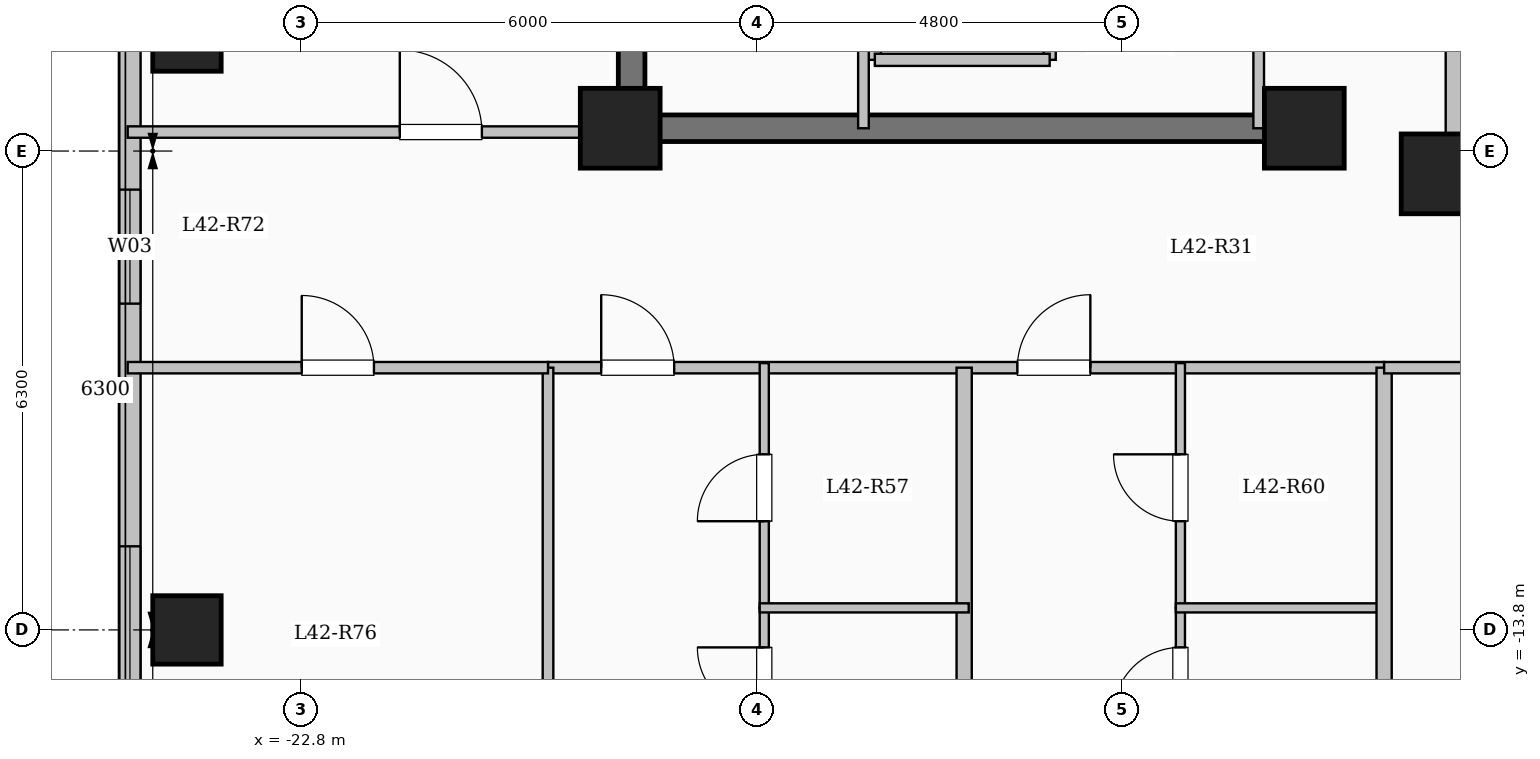
"""IFC4 building model, lengths in metres.
Left out: names, types, materials, properties, quantities, classifications, styles, units other than length and angle.
Written with IfcOpenShell. Run it as: python <this file> out.ifc"""

import sys

from ifc_helpers import new_model, si_unit, direction, frame, frame_2d, origin, origin_2d, place, context, subcontext, project, spatial, rectangle, extrude, element, fill, save


model = new_model("IFC4")
c1 = context("Model", 3, precision=1e-05, world=origin(), true_north=direction((0.0, 1.0)))
c2 = subcontext(c1, "Body", "Model", "MODEL_VIEW")
j1 = project(units=[si_unit("LENGTHUNIT", "METRE"), si_unit("PLANEANGLEUNIT", "RADIAN")], contexts=[c1])
p1 = place(None, origin())
s1 = spatial("IfcSite", under=j1, at=p1, CompositionType="ELEMENT")
p2 = place(p1, origin())
s2 = spatial("IfcBuilding", under=s1, at=p2, CompositionType="ELEMENT")
p3 = place(p2, frame((0.0, 0.0, 156.05)))
s3 = spatial("IfcBuildingStorey", under=s2, at=p3, CompositionType="ELEMENT", Elevation=156.05)
for number, where, z_axis, x_axis in (
    (1, (-7.8, -7.8, 0.0), (0.0, 0.0, 1.0), (1.0, 0.0, 0.0)),
    (2, (-9.6, -7.2, 0.0), (0.0, 0.0, 1.0), (1.0, 0.0, 0.0)),
    (3, (-18.6, -7.2, 0.0), (0.0, 0.0, 1.0), (1.0, 0.0, 0.0)),
):
    element("IfcColumn", number, at=place(p3, frame(where, z_axis=z_axis, x_axis=x_axis)), inside=s3, PredefinedType="COLUMN", context=c2, shape_type="SweptSolid", body=[
        extrude(rectangle(XDim=1.05, YDim=1.05, at=origin_2d()), origin(), (0.0, 0.0, 1.0), 3.35),
    ])
for number, where, z_axis, x_axis in (
    (4, (-24.3, -13.8, 0.0), (0.0, 0.0, 1.0), (1.0, 0.0, 0.0)),
    (5, (-24.3, -6.0, 0.0), (0.0, 0.0, 1.0), (1.0, 0.0, 0.0)),
):
    element("IfcColumn", number, at=place(p3, frame(where, z_axis=z_axis, x_axis=x_axis)), inside=s3, PredefinedType="COLUMN", context=c2, shape_type="SweptSolid", body=[
        extrude(rectangle(XDim=0.9, YDim=0.9, at=origin_2d()), origin(), (0.0, 0.0, 1.0), 3.35),
    ])
p4 = place(p3, frame((-7.62, -7.62, 0.0), z_axis=(0.0, 0.0, 1.0), x_axis=(1.0, 0.0, 0.0)))
e6 = element("IfcWall", 6, at=p4, inside=s3, PredefinedType="SOLIDWALL", context=c2, shape_type="SweptSolid", body=[
    extrude(rectangle(XDim=15.24, YDim=0.24, at=frame_2d((7.62, 0.0))), origin(), (0.0, 0.0, 1.0), 3.1),
])
p5 = place(p4, frame((6.92, 0.0, 0.95)))
e7 = element("IfcOpeningElement", 7, at=p5, cuts=e6, PredefinedType="OPENING", context=c2, shape_type="SweptSolid", body=[
    extrude(rectangle(XDim=1.4, YDim=1.5, at=frame_2d((0.7, 0.75))), frame((0.0, 0.13, 0.0), z_axis=(0.0, -1.0, 0.0), x_axis=(1.0, 0.0, 0.0)), (0.0, 0.0, 1.0), 0.26),
])
p6 = place(p3, frame((-7.62, 7.62, 0.0), z_axis=(0.0, 0.0, 1.0), x_axis=(0.0, -1.0, 0.0)))
e8 = element("IfcWall", 8, at=p6, inside=s3, PredefinedType="SOLIDWALL", context=c2, shape_type="SweptSolid", body=[
    extrude(rectangle(XDim=15.24, YDim=0.24, at=frame_2d((7.62, 0.0))), origin(), (0.0, 0.0, 1.0), 3.1),
])
p7 = place(p6, frame((6.92, 0.0, 0.95)))
e9 = element("IfcOpeningElement", 9, at=p7, cuts=e8, PredefinedType="OPENING", context=c2, shape_type="SweptSolid", body=[
    extrude(rectangle(XDim=1.4, YDim=1.5, at=frame_2d((0.7, 0.75))), frame((0.0, 0.13, 0.0), z_axis=(0.0, -1.0, 0.0), x_axis=(1.0, 0.0, 0.0)), (0.0, 0.0, 1.0), 0.26),
])
p8 = place(p3, frame((-25.05, -17.25, 0.0), z_axis=(0.0, 0.0, 1.0), x_axis=(0.0, 1.0, 0.0)))
e10 = element("IfcWall", 10, at=p8, inside=s3, PredefinedType="SOLIDWALL", context=c2, shape_type="SweptSolid", body=[
    extrude(rectangle(XDim=34.5, YDim=0.28, at=frame_2d((17.25, 0.0))), origin(), (0.0, 0.0, 1.0), 3.1),
])
p9 = place(p8, frame((2.35, 0.0, 0.9)))
e11 = element("IfcOpeningElement", 11, at=p9, cuts=e10, PredefinedType="OPENING", context=c2, shape_type="SweptSolid", body=[
    extrude(rectangle(XDim=2.2, YDim=1.75, at=frame_2d((1.1, 0.875))), frame((0.0, 0.15, 0.0), z_axis=(0.0, -1.0, 0.0), x_axis=(1.0, 0.0, 0.0)), (0.0, 0.0, 1.0), 0.3),
])
p10 = place(p8, frame((7.742, 0.0, 0.9)))
e12 = element("IfcOpeningElement", 12, at=p10, cuts=e10, PredefinedType="OPENING", context=c2, shape_type="SweptSolid", body=[
    extrude(rectangle(XDim=1.5, YDim=1.65, at=frame_2d((0.75, 0.825))), frame((0.0, 0.15, 0.0), z_axis=(0.0, -1.0, 0.0), x_axis=(1.0, 0.0, 0.0)), (0.0, 0.0, 1.0), 0.3),
])
p11 = place(p8, frame((18.0, 0.0, 0.9)))
e13 = element("IfcOpeningElement", 13, at=p11, cuts=e10, PredefinedType="OPENING", context=c2, shape_type="SweptSolid", body=[
    extrude(rectangle(XDim=2.0, YDim=1.7, at=frame_2d((1.0, 0.85))), frame((0.0, 0.15, 0.0), z_axis=(0.0, -1.0, 0.0), x_axis=(1.0, 0.0, 0.0)), (0.0, 0.0, 1.0), 0.3),
])
p12 = place(p8, frame((28.375, 0.0, 0.95)))
e14 = element("IfcOpeningElement", 14, at=p12, cuts=e10, PredefinedType="OPENING", context=c2, shape_type="SweptSolid", body=[
    extrude(rectangle(XDim=1.0, YDim=1.5, at=frame_2d((0.5, 0.75))), frame((0.0, 0.15, 0.0), z_axis=(0.0, -1.0, 0.0), x_axis=(1.0, 0.0, 0.0)), (0.0, 0.0, 1.0), 0.3),
])
p13 = place(p8, frame((31.125, 0.0, 0.9)))
e15 = element("IfcOpeningElement", 15, at=p13, cuts=e10, PredefinedType="OPENING", context=c2, shape_type="SweptSolid", body=[
    extrude(rectangle(XDim=2.0, YDim=1.7, at=frame_2d((1.0, 0.85))), frame((0.0, 0.15, 0.0), z_axis=(0.0, -1.0, 0.0), x_axis=(1.0, 0.0, 0.0)), (0.0, 0.0, 1.0), 0.3),
])
for number, where, z_axis, x_axis in (
    (16, (-15.25, -6.3, 0.0), (0.0, 0.0, 1.0), (0.0, 1.0, 0.0)),
    (17, (-12.95, -6.3, 0.0), (0.0, 0.0, 1.0), (0.0, 1.0, 0.0)),
):
    element("IfcWall", number, at=place(p3, frame(where, z_axis=z_axis, x_axis=x_axis)), inside=s3, PredefinedType="SOLIDWALL", context=c2, shape_type="SweptSolid", body=[
        extrude(rectangle(XDim=2.6, YDim=0.16, at=frame_2d((1.3, 0.0))), origin(), (0.0, 0.0, 1.0), 3.1),
    ])
p14 = place(p3, frame((-15.25, -6.3, 0.0), z_axis=(0.0, 0.0, 1.0), x_axis=(1.0, 0.0, 0.0)))
e18 = element("IfcWall", 18, at=p14, inside=s3, PredefinedType="SOLIDWALL", context=c2, shape_type="SweptSolid", body=[
    extrude(rectangle(XDim=2.3, YDim=0.16, at=frame_2d((1.15, 0.0))), origin(), (0.0, 0.0, 1.0), 3.1),
])
p15 = place(p3, frame((-18.45, -7.375, 0.0), z_axis=(0.0, 0.0, 1.0), x_axis=(0.0, 1.0, 0.0)))
e19 = element("IfcWall", 19, at=p15, inside=s3, PredefinedType="SHEAR", context=c2, shape_type="SweptSolid", body=[
    extrude(rectangle(XDim=14.05, YDim=0.35, at=frame_2d((7.025, 0.0))), origin(), (0.0, 0.0, 1.0), 3.35),
])
p16 = place(p3, frame((-18.625, -7.2, 0.0), z_axis=(0.0, 0.0, 1.0), x_axis=(1.0, 0.0, 0.0)))
e20 = element("IfcWall", 20, at=p16, inside=s3, PredefinedType="SHEAR", context=c2, shape_type="SweptSolid", body=[
    extrude(rectangle(XDim=8.55, YDim=0.35, at=frame_2d((4.275, 0.0))), origin(), (0.0, 0.0, 1.0), 3.35),
])
p17 = place(p3, frame((-15.4, -7.2, 0.0), z_axis=(0.0, 0.0, 1.0), x_axis=(0.0, 1.0, 0.0)))
e21 = element("IfcWall", 21, at=p17, inside=s3, PredefinedType="PARTITIONING", context=c2, shape_type="SweptSolid", body=[
    extrude(rectangle(XDim=10.45, YDim=0.14, at=frame_2d((5.225, 0.0))), origin(), (0.0, 0.0, 1.0), 3.1),
])
p18 = place(p17, frame((9.25, 0.0, 0.0)))
e22 = element("IfcOpeningElement", 22, at=p18, cuts=e21, PredefinedType="OPENING", context=c2, shape_type="SweptSolid", body=[
    extrude(rectangle(XDim=0.9, YDim=2.08, at=frame_2d((0.45, 1.04))), frame((0.0, 0.08, 0.0), z_axis=(0.0, -1.0, 0.0), x_axis=(1.0, 0.0, 0.0)), (0.0, 0.0, 1.0), 0.16),
])
p19 = place(p3, frame((-10.2, -7.2, 0.0), z_axis=(0.0, 0.0, 1.0), x_axis=(0.0, 1.0, 0.0)))
e23 = element("IfcWall", 23, at=p19, inside=s3, PredefinedType="PARTITIONING", context=c2, shape_type="SweptSolid", body=[
    extrude(rectangle(XDim=9.12, YDim=0.14, at=frame_2d((4.56, 0.0))), origin(), (0.0, 0.0, 1.0), 3.1),
])
p20 = place(p19, frame((1.9, 0.0, 0.0)))
e24 = element("IfcOpeningElement", 24, at=p20, cuts=e23, PredefinedType="OPENING", context=c2, shape_type="SweptSolid", body=[
    extrude(rectangle(XDim=0.95, YDim=2.12, at=frame_2d((0.475, 1.06))), frame((0.0, 0.08, 0.0), z_axis=(0.0, -1.0, 0.0), x_axis=(1.0, 0.0, 0.0)), (0.0, 0.0, 1.0), 0.16),
])
p21 = place(p19, frame((5.0, 0.0, 0.0)))
e25 = element("IfcOpeningElement", 25, at=p21, cuts=e23, PredefinedType="OPENING", context=c2, shape_type="SweptSolid", body=[
    extrude(rectangle(XDim=0.95, YDim=2.12, at=frame_2d((0.475, 1.06))), frame((0.0, 0.08, 0.0), z_axis=(0.0, -1.0, 0.0), x_axis=(1.0, 0.0, 0.0)), (0.0, 0.0, 1.0), 0.16),
])
p22 = place(p3, frame((-19.55, -10.35, 0.0), z_axis=(0.0, 0.0, 1.0), x_axis=(1.0, 0.0, 0.0)))
e26 = element("IfcWall", 26, at=p22, inside=s3, PredefinedType="PARTITIONING", context=c2, shape_type="SweptSolid", body=[
    extrude(rectangle(XDim=11.0, YDim=0.15, at=frame_2d((5.5, 0.0))), origin(), (0.0, 0.0, 1.0), 3.1),
])
p23 = place(p22, frame((0.7, 0.0, 0.0)))
e27 = element("IfcOpeningElement", 27, at=p23, cuts=e26, PredefinedType="OPENING", context=c2, shape_type="SweptSolid", body=[
    extrude(rectangle(XDim=0.96, YDim=2.15, at=frame_2d((0.48, 1.075))), frame((0.0, 0.085, 0.0), z_axis=(0.0, -1.0, 0.0), x_axis=(1.0, 0.0, 0.0)), (0.0, 0.0, 1.0), 0.17),
])
p24 = place(p22, frame((6.175, 0.0, 0.0)))
e28 = element("IfcOpeningElement", 28, at=p24, cuts=e26, PredefinedType="OPENING", context=c2, shape_type="SweptSolid", body=[
    extrude(rectangle(XDim=0.96, YDim=2.15, at=frame_2d((0.48, 1.075))), frame((0.0, 0.085, 0.0), z_axis=(0.0, -1.0, 0.0), x_axis=(1.0, 0.0, 0.0)), (0.0, 0.0, 1.0), 0.17),
])
p25 = place(p3, frame((-14.075, -21.2, 0.0), z_axis=(0.0, 0.0, 1.0), x_axis=(0.0, 1.0, 0.0)))
e29 = element("IfcWall", 29, at=p25, inside=s3, PredefinedType="SOLIDWALL", context=c2, shape_type="SweptSolid", body=[
    extrude(rectangle(XDim=10.85, YDim=0.2, at=frame_2d((5.425, 0.0))), origin(), (0.0, 0.0, 1.0), 3.1),
])
p26 = place(p3, frame((-16.705, -21.2, 0.0), z_axis=(0.0, 0.0, 1.0), x_axis=(0.0, 1.0, 0.0)))
e30 = element("IfcWall", 30, at=p26, inside=s3, PredefinedType="PARTITIONING", context=c2, shape_type="SweptSolid", body=[
    extrude(rectangle(XDim=7.69, YDim=0.12, at=frame_2d((3.845, 0.0))), origin(), (0.0, 0.0, 1.0), 3.1),
])
p27 = place(p26, frame((6.29, 0.0, 0.0)))
e31 = element("IfcOpeningElement", 31, at=p27, cuts=e30, PredefinedType="OPENING", context=c2, shape_type="SweptSolid", body=[
    extrude(rectangle(XDim=0.88, YDim=2.1, at=frame_2d((0.44, 1.05))), frame((0.0, 0.07, 0.0), z_axis=(0.0, -1.0, 0.0), x_axis=(1.0, 0.0, 0.0)), (0.0, 0.0, 1.0), 0.14),
])
p28 = place(p3, frame((-16.705, -13.51, 0.0), z_axis=(0.0, 0.0, 1.0), x_axis=(0.0, 1.0, 0.0)))
e32 = element("IfcWall", 32, at=p28, inside=s3, PredefinedType="PARTITIONING", context=c2, shape_type="SweptSolid", body=[
    extrude(rectangle(XDim=3.22, YDim=0.12, at=frame_2d((1.61, 0.0))), origin(), (0.0, 0.0, 1.0), 3.1),
])
p29 = place(p28, frame((1.14, 0.0, 0.0)))
e33 = element("IfcOpeningElement", 33, at=p29, cuts=e32, PredefinedType="OPENING", context=c2, shape_type="SweptSolid", body=[
    extrude(rectangle(XDim=0.88, YDim=2.1, at=frame_2d((0.44, 1.05))), frame((0.0, 0.07, 0.0), z_axis=(0.0, -1.0, 0.0), x_axis=(1.0, 0.0, 0.0)), (0.0, 0.0, 1.0), 0.14),
])
p30 = place(p3, frame((-16.765, -13.51, 0.0), z_axis=(0.0, 0.0, 1.0), x_axis=(1.0, 0.0, 0.0)))
e34 = element("IfcWall", 34, at=p30, inside=s3, PredefinedType="PARTITIONING", context=c2, shape_type="SweptSolid", body=[
    extrude(rectangle(XDim=2.75, YDim=0.12, at=frame_2d((1.375, 0.0))), origin(), (0.0, 0.0, 1.0), 3.1),
])
p31 = place(p3, frame((-11.23, -21.2, 0.0), z_axis=(0.0, 0.0, 1.0), x_axis=(0.0, 1.0, 0.0)))
e35 = element("IfcWall", 35, at=p31, inside=s3, PredefinedType="PARTITIONING", context=c2, shape_type="SweptSolid", body=[
    extrude(rectangle(XDim=7.69, YDim=0.12, at=frame_2d((3.845, 0.0))), origin(), (0.0, 0.0, 1.0), 3.1),
])
p32 = place(p31, frame((6.29, 0.0, 0.0)))
e36 = element("IfcOpeningElement", 36, at=p32, cuts=e35, PredefinedType="OPENING", context=c2, shape_type="SweptSolid", body=[
    extrude(rectangle(XDim=0.88, YDim=2.1, at=frame_2d((0.44, 1.05))), frame((0.0, 0.07, 0.0), z_axis=(0.0, -1.0, 0.0), x_axis=(1.0, 0.0, 0.0)), (0.0, 0.0, 1.0), 0.14),
])
p33 = place(p3, frame((-11.23, -13.51, 0.0), z_axis=(0.0, 0.0, 1.0), x_axis=(0.0, 1.0, 0.0)))
e37 = element("IfcWall", 37, at=p33, inside=s3, PredefinedType="PARTITIONING", context=c2, shape_type="SweptSolid", body=[
    extrude(rectangle(XDim=3.22, YDim=0.12, at=frame_2d((1.61, 0.0))), origin(), (0.0, 0.0, 1.0), 3.1),
])
p34 = place(p33, frame((1.14, 0.0, 0.0)))
e38 = element("IfcOpeningElement", 38, at=p34, cuts=e37, PredefinedType="OPENING", context=c2, shape_type="SweptSolid", body=[
    extrude(rectangle(XDim=0.88, YDim=2.1, at=frame_2d((0.44, 1.05))), frame((0.0, 0.07, 0.0), z_axis=(0.0, -1.0, 0.0), x_axis=(1.0, 0.0, 0.0)), (0.0, 0.0, 1.0), 0.14),
])
p35 = place(p3, frame((-11.29, -13.51, 0.0), z_axis=(0.0, 0.0, 1.0), x_axis=(1.0, 0.0, 0.0)))
e39 = element("IfcWall", 39, at=p35, inside=s3, PredefinedType="PARTITIONING", context=c2, shape_type="SweptSolid", body=[
    extrude(rectangle(XDim=2.75, YDim=0.12, at=frame_2d((1.375, 0.0))), origin(), (0.0, 0.0, 1.0), 3.1),
])
p36 = place(p3, frame((-8.55, -21.804, 0.0), z_axis=(0.0, 0.0, 1.0), x_axis=(0.0, 1.0, 0.0)))
e40 = element("IfcWall", 40, at=p36, inside=s3, PredefinedType="SOLIDWALL", context=c2, shape_type="SweptSolid", body=[
    extrude(rectangle(XDim=11.454, YDim=0.2, at=frame_2d((5.727, 0.0))), origin(), (0.0, 0.0, 1.0), 3.1),
])
p37 = place(p3, frame((-8.55, -10.35, 0.0), z_axis=(0.0, 0.0, 1.0), x_axis=(1.0, 0.0, 0.0)))
e41 = element("IfcWall", 41, at=p37, inside=s3, PredefinedType="PARTITIONING", context=c2, shape_type="SweptSolid", body=[
    extrude(rectangle(XDim=17.1, YDim=0.15, at=frame_2d((8.55, 0.0))), origin(), (0.0, 0.0, 1.0), 3.1),
])
p38 = place(p37, frame((1.6, 0.0, 0.0)))
e42 = element("IfcOpeningElement", 42, at=p38, cuts=e41, PredefinedType="OPENING", context=c2, shape_type="SweptSolid", body=[
    extrude(rectangle(XDim=0.95, YDim=2.15, at=frame_2d((0.475, 1.075))), frame((0.0, 0.085, 0.0), z_axis=(0.0, -1.0, 0.0), x_axis=(1.0, 0.0, 0.0)), (0.0, 0.0, 1.0), 0.17),
])
p39 = place(p37, frame((10.5, 0.0, 0.0)))
e43 = element("IfcOpeningElement", 43, at=p39, cuts=e41, PredefinedType="OPENING", context=c2, shape_type="SweptSolid", body=[
    extrude(rectangle(XDim=0.95, YDim=2.15, at=frame_2d((0.475, 1.075))), frame((0.0, 0.085, 0.0), z_axis=(0.0, -1.0, 0.0), x_axis=(1.0, 0.0, 0.0)), (0.0, 0.0, 1.0), 0.17),
])
p40 = place(p3, frame((-25.08, -7.25, 0.0), z_axis=(0.0, 0.0, 1.0), x_axis=(1.0, 0.0, 0.0)))
e44 = element("IfcWall", 44, at=p40, inside=s3, PredefinedType="PARTITIONING", context=c2, shape_type="SweptSolid", body=[
    extrude(rectangle(XDim=6.63, YDim=0.15, at=frame_2d((3.315, 0.0))), origin(), (0.0, 0.0, 1.0), 3.1),
])
p41 = place(p40, frame((3.58, 0.0, 0.0)))
e45 = element("IfcOpeningElement", 45, at=p41, cuts=e44, PredefinedType="OPENING", context=c2, shape_type="SweptSolid", body=[
    extrude(rectangle(XDim=1.08, YDim=2.15, at=frame_2d((0.54, 1.075))), frame((0.0, 0.085, 0.0), z_axis=(0.0, -1.0, 0.0), x_axis=(1.0, 0.0, 0.0)), (0.0, 0.0, 1.0), 0.17),
])
p42 = place(p3, frame((-19.55, -17.25, 0.0), z_axis=(0.0, 0.0, 1.0), x_axis=(0.0, 1.0, 0.0)))
e46 = element("IfcWall", 46, at=p42, inside=s3, PredefinedType="PARTITIONING", context=c2, shape_type="SweptSolid", body=[
    extrude(rectangle(XDim=6.9, YDim=0.14, at=frame_2d((3.45, 0.0))), origin(), (0.0, 0.0, 1.0), 3.1),
])
p43 = place(p3, frame((-25.08, -10.35, 0.0), z_axis=(0.0, 0.0, 1.0), x_axis=(1.0, 0.0, 0.0)))
e47 = element("IfcWall", 47, at=p43, inside=s3, PredefinedType="PARTITIONING", context=c2, shape_type="SweptSolid", body=[
    extrude(rectangle(XDim=5.53, YDim=0.15, at=frame_2d((2.765, 0.0))), origin(), (0.0, 0.0, 1.0), 3.1),
])
p44 = place(p43, frame((2.29, 0.0, 0.0)))
e48 = element("IfcOpeningElement", 48, at=p44, cuts=e47, PredefinedType="OPENING", context=c2, shape_type="SweptSolid", body=[
    extrude(rectangle(XDim=0.95, YDim=2.15, at=frame_2d((0.475, 1.075))), frame((0.0, 0.085, 0.0), z_axis=(0.0, -1.0, 0.0), x_axis=(1.0, 0.0, 0.0)), (0.0, 0.0, 1.0), 0.17),
])
p45 = place(p9, origin())
e49 = element("IfcWindow", 49, at=p45, inside=s3, PartitioningType="SINGLE_PANEL", PredefinedType="WINDOW", context=c2, shape_type="SweptSolid", body=[
    extrude(rectangle(XDim=2.2, YDim=1.75, at=frame_2d((1.1, 0.875))), frame((0.0, 0.03, 0.0), z_axis=(0.0, -1.0, 0.0), x_axis=(1.0, 0.0, 0.0)), (0.0, 0.0, 1.0), 0.06),
])
fill(e11, e49)
p46 = place(p10, origin())
e50 = element("IfcWindow", 50, at=p46, inside=s3, PartitioningType="SINGLE_PANEL", PredefinedType="WINDOW", context=c2, shape_type="SweptSolid", body=[
    extrude(rectangle(XDim=1.5, YDim=1.65, at=frame_2d((0.75, 0.825))), frame((0.0, 0.03, 0.0), z_axis=(0.0, -1.0, 0.0), x_axis=(1.0, 0.0, 0.0)), (0.0, 0.0, 1.0), 0.06),
])
fill(e12, e50)
p47 = place(p23, origin())
e51 = element("IfcDoor", 51, at=p47, inside=s3, OperationType="SINGLE_SWING_LEFT", PredefinedType="DOOR", context=c2, shape_type="SweptSolid", body=[
    extrude(rectangle(XDim=0.96, YDim=2.15, at=frame_2d((0.48, 1.075))), frame((0.0, 0.025, 0.0), z_axis=(0.0, -1.0, 0.0), x_axis=(1.0, 0.0, 0.0)), (0.0, 0.0, 1.0), 0.05),
])
fill(e27, e51)
p48 = place(p27, origin())
e52 = element("IfcDoor", 52, at=p48, inside=s3, OperationType="SINGLE_SWING_RIGHT", PredefinedType="DOOR", context=c2, shape_type="SweptSolid", body=[
    extrude(rectangle(XDim=0.88, YDim=2.1, at=frame_2d((0.44, 1.05))), frame((0.0, 0.025, 0.0), z_axis=(0.0, -1.0, 0.0), x_axis=(1.0, 0.0, 0.0)), (0.0, 0.0, 1.0), 0.05),
])
fill(e31, e52)
p49 = place(p29, origin())
e53 = element("IfcDoor", 53, at=p49, inside=s3, OperationType="SINGLE_SWING_LEFT", PredefinedType="DOOR", context=c2, shape_type="SweptSolid", body=[
    extrude(rectangle(XDim=0.88, YDim=2.1, at=frame_2d((0.44, 1.05))), frame((0.0, 0.025, 0.0), z_axis=(0.0, -1.0, 0.0), x_axis=(1.0, 0.0, 0.0)), (0.0, 0.0, 1.0), 0.05),
])
fill(e33, e53)
p50 = place(p24, origin())
e54 = element("IfcDoor", 54, at=p50, inside=s3, OperationType="SINGLE_SWING_RIGHT", PredefinedType="DOOR", context=c2, shape_type="SweptSolid", body=[
    extrude(rectangle(XDim=0.96, YDim=2.15, at=frame_2d((0.48, 1.075))), frame((0.0, 0.025, 0.0), z_axis=(0.0, -1.0, 0.0), x_axis=(1.0, 0.0, 0.0)), (0.0, 0.0, 1.0), 0.05),
])
fill(e28, e54)
p51 = place(p32, origin())
e55 = element("IfcDoor", 55, at=p51, inside=s3, OperationType="SINGLE_SWING_LEFT", PredefinedType="DOOR", context=c2, shape_type="SweptSolid", body=[
    extrude(rectangle(XDim=0.88, YDim=2.1, at=frame_2d((0.44, 1.05))), frame((0.0, 0.025, 0.0), z_axis=(0.0, -1.0, 0.0), x_axis=(1.0, 0.0, 0.0)), (0.0, 0.0, 1.0), 0.05),
])
fill(e36, e55)
p52 = place(p34, origin())
e56 = element("IfcDoor", 56, at=p52, inside=s3, OperationType="SINGLE_SWING_RIGHT", PredefinedType="DOOR", context=c2, shape_type="SweptSolid", body=[
    extrude(rectangle(XDim=0.88, YDim=2.1, at=frame_2d((0.44, 1.05))), frame((0.0, 0.025, 0.0), z_axis=(0.0, -1.0, 0.0), x_axis=(1.0, 0.0, 0.0)), (0.0, 0.0, 1.0), 0.05),
])
fill(e38, e56)
p53 = place(p44, origin())
e57 = element("IfcDoor", 57, at=p53, inside=s3, OperationType="SINGLE_SWING_LEFT", PredefinedType="DOOR", context=c2, shape_type="SweptSolid", body=[
    extrude(rectangle(XDim=0.95, YDim=2.15, at=frame_2d((0.475, 1.075))), frame((0.0, 0.025, 0.0), z_axis=(0.0, -1.0, 0.0), x_axis=(1.0, 0.0, 0.0)), (0.0, 0.0, 1.0), 0.05),
])
fill(e48, e57)
p54 = place(p41, origin())
e58 = element("IfcDoor", 58, at=p54, inside=s3, OperationType="SINGLE_SWING_LEFT", PredefinedType="DOOR", context=c2, shape_type="SweptSolid", body=[
    extrude(rectangle(XDim=1.08, YDim=2.15, at=frame_2d((0.54, 1.075))), frame((0.0, 0.025, 0.0), z_axis=(0.0, -1.0, 0.0), x_axis=(1.0, 0.0, 0.0)), (0.0, 0.0, 1.0), 0.05),
])
fill(e45, e58)
save(model, sys.argv[1])
